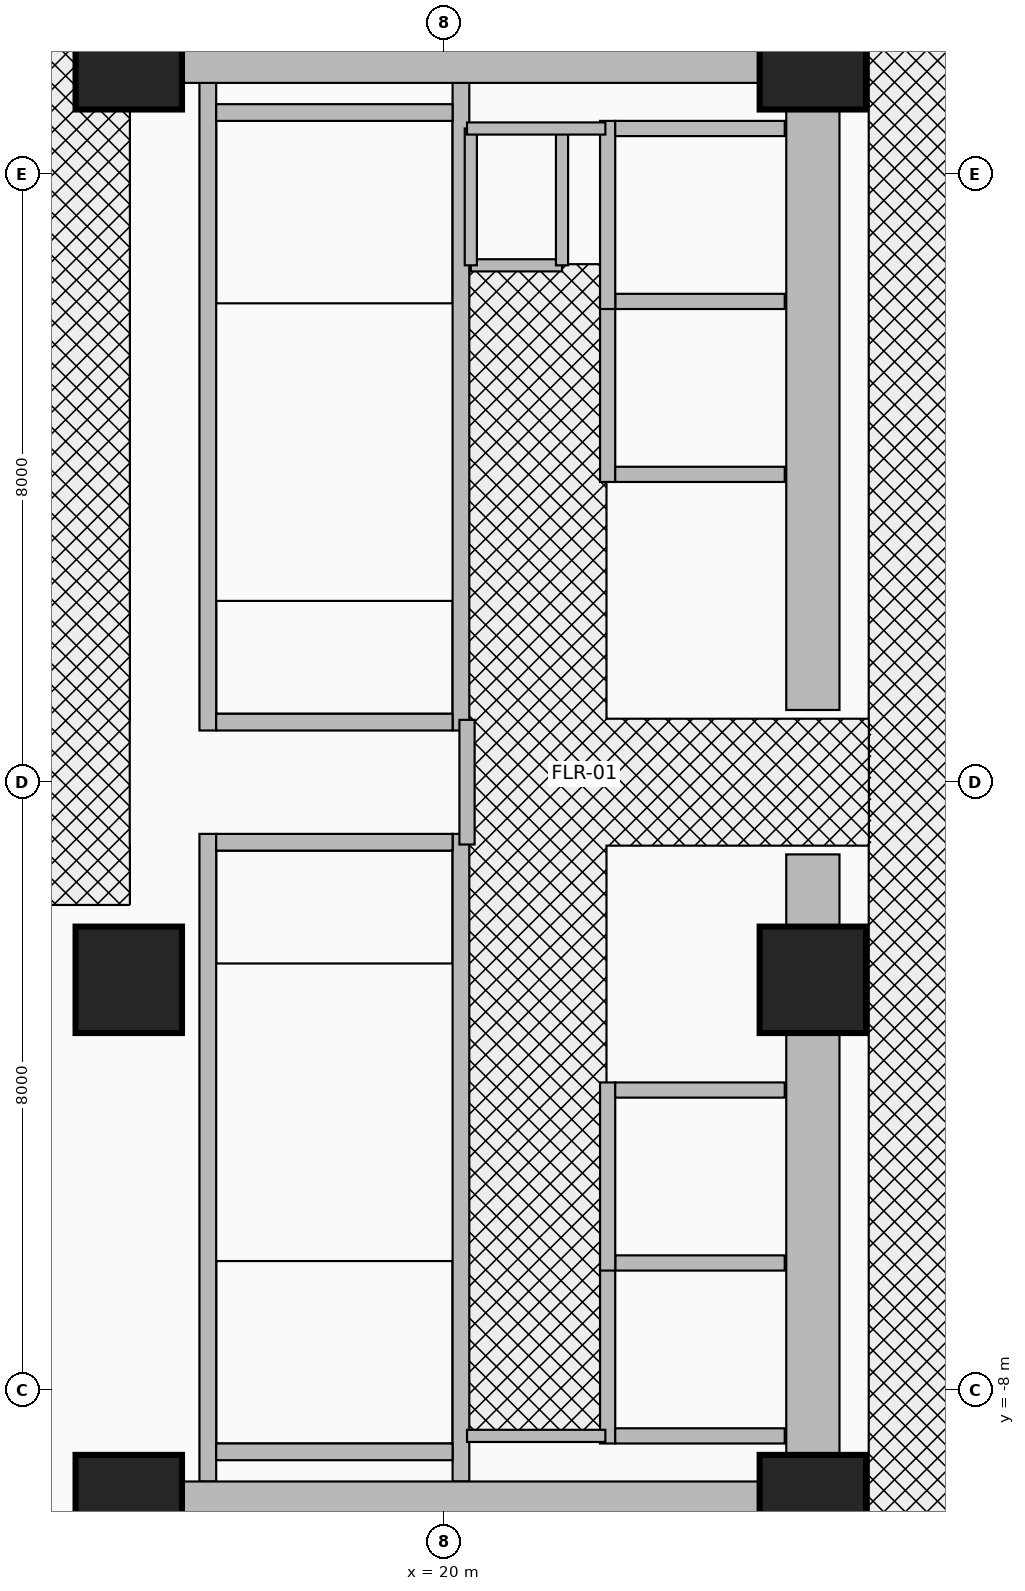
"""IFC4 building model, lengths in metres.
Left out: names, types, materials, properties, quantities, classifications, styles, units other than length and angle.
Written with IfcOpenShell. Run it as: python <this file> out.ifc"""

import sys

from ifc_helpers import new_model, si_unit, direction, frame, frame_2d, origin, origin_2d, place, context, subcontext, project, spatial, rectangle, extrude, source, transform, mapped, element, fill, save


model = new_model("IFC4")
c1 = context("Model", 3, precision=1e-05, world=origin(), true_north=direction((0.0, 1.0)))
c2 = subcontext(c1, "Body", "Model", "MODEL_VIEW")
j1 = project(units=[si_unit("LENGTHUNIT", "METRE"), si_unit("PLANEANGLEUNIT", "RADIAN")], contexts=[c1])
p1 = place(None, origin())
s1 = spatial("IfcSite", under=j1, at=p1, CompositionType="ELEMENT")
p2 = place(p1, origin())
s2 = spatial("IfcBuilding", under=s1, at=p2, CompositionType="ELEMENT")
p3 = place(p2, frame((0.0, 0.0, 15.6)))
s3 = spatial("IfcBuildingStorey", under=s2, at=p3, CompositionType="ELEMENT", Elevation=15.6)
for number, where, z_axis, x_axis in (
    (1, (16.89, 0.68, 0.0), (0.0, 0.0, 1.0), (0.0, 1.0, 0.0)),
    (2, (20.22, 0.68, 0.0), (0.0, 0.0, 1.0), (0.0, 1.0, 0.0)),
):
    element("IfcWall", number, at=place(p3, frame(where, z_axis=z_axis, x_axis=x_axis)), inside=s3, PredefinedType="SHEAR", context=c2, shape_type="SweptSolid", body=[
        extrude(rectangle(XDim=8.52, YDim=0.22, at=frame_2d((4.26, 0.0))), origin(), (0.0, 0.0, 1.0), 4.8),
    ])
p4 = place(p3, frame((17.0, 0.79, 0.0), z_axis=(0.0, 0.0, 1.0), x_axis=(1.0, 0.0, 0.0)))
e3 = element("IfcWall", 3, at=p4, inside=s3, PredefinedType="SHEAR", context=c2, shape_type="SweptSolid", body=[
    extrude(rectangle(XDim=3.11, YDim=0.22, at=frame_2d((1.555, 0.0))), origin(), (0.0, 0.0, 1.0), 4.8),
])
p5 = place(p4, frame((0.95, 0.0, 0.0)))
e4 = element("IfcOpeningElement", 4, at=p5, cuts=e3, PredefinedType="OPENING", context=c2, shape_type="SweptSolid", body=[
    extrude(rectangle(XDim=1.1, YDim=2.15, at=frame_2d((0.55, 1.075))), frame((0.0, 0.125, 0.0), z_axis=(0.0, -1.0, 0.0), x_axis=(1.0, 0.0, 0.0)), (0.0, 0.0, 1.0), 0.25),
])
p6 = place(p3, frame((17.0, 8.81, 0.0), z_axis=(0.0, 0.0, 1.0), x_axis=(1.0, 0.0, 0.0)))
e5 = element("IfcWall", 5, at=p6, inside=s3, PredefinedType="SHEAR", context=c2, shape_type="SweptSolid", body=[
    extrude(rectangle(XDim=3.11, YDim=0.22, at=frame_2d((1.555, 0.0))), origin(), (0.0, 0.0, 1.0), 4.8),
])
for number, where, z_axis, x_axis in (
    (6, (16.89, -9.2, 0.0), (0.0, 0.0, 1.0), (0.0, 1.0, 0.0)),
    (7, (20.22, -9.2, 0.0), (0.0, 0.0, 1.0), (0.0, 1.0, 0.0)),
):
    element("IfcWall", number, at=place(p3, frame(where, z_axis=z_axis, x_axis=x_axis)), inside=s3, PredefinedType="SHEAR", context=c2, shape_type="SweptSolid", body=[
        extrude(rectangle(XDim=8.52, YDim=0.22, at=frame_2d((4.26, 0.0))), origin(), (0.0, 0.0, 1.0), 4.8),
    ])
p7 = place(p3, frame((17.0, -8.81, 0.0), z_axis=(0.0, 0.0, 1.0), x_axis=(1.0, 0.0, 0.0)))
e8 = element("IfcWall", 8, at=p7, inside=s3, PredefinedType="SHEAR", context=c2, shape_type="SweptSolid", body=[
    extrude(rectangle(XDim=3.11, YDim=0.22, at=frame_2d((1.555, 0.0))), origin(), (0.0, 0.0, 1.0), 4.8),
])
p8 = place(p3, frame((17.0, -0.79, 0.0), z_axis=(0.0, 0.0, 1.0), x_axis=(1.0, 0.0, 0.0)))
e9 = element("IfcWall", 9, at=p8, inside=s3, PredefinedType="SHEAR", context=c2, shape_type="SweptSolid", body=[
    extrude(rectangle(XDim=3.11, YDim=0.22, at=frame_2d((1.555, 0.0))), origin(), (0.0, 0.0, 1.0), 4.8),
])
p9 = place(p8, frame((0.95, 0.0, 0.0)))
e10 = element("IfcOpeningElement", 10, at=p9, cuts=e9, PredefinedType="OPENING", context=c2, shape_type="SweptSolid", body=[
    extrude(rectangle(XDim=1.1, YDim=2.15, at=frame_2d((0.55, 1.075))), frame((0.0, 0.125, 0.0), z_axis=(0.0, -1.0, 0.0), x_axis=(1.0, 0.0, 0.0)), (0.0, 0.0, 1.0), 0.25),
])
for number, where, z_axis, x_axis in (
    (11, (24.85, -9.9, 0.0), (0.0, 0.0, 1.0), (0.0, 1.0, 0.0)),
    (12, (24.85, 0.95, 0.0), (0.0, 0.0, 1.0), (0.0, 1.0, 0.0)),
):
    element("IfcWall", number, at=place(p3, frame(where, z_axis=z_axis, x_axis=x_axis)), inside=s3, PredefinedType="SHEAR", context=c2, shape_type="SweptSolid", body=[
        extrude(rectangle(XDim=8.95, YDim=0.7, at=frame_2d((4.475, 0.0))), origin(), (0.0, 0.0, 1.0), 4.8),
    ])
for number, where, z_axis, x_axis in (
    (13, (15.85, 9.55, 0.0), (0.0, 0.0, 1.0), (1.0, 0.0, 0.0)),
    (14, (15.85, -9.55, 0.0), (0.0, 0.0, 1.0), (1.0, 0.0, 0.0)),
):
    element("IfcWall", number, at=place(p3, frame(where, z_axis=z_axis, x_axis=x_axis)), inside=s3, PredefinedType="SHEAR", context=c2, shape_type="SweptSolid", body=[
        extrude(rectangle(XDim=9.0, YDim=0.7, at=frame_2d((4.5, 0.0))), origin(), (0.0, 0.0, 1.0), 4.8),
    ])
m1 = source(origin(), c2, "Body", "SweptSolid", [
    extrude(rectangle(XDim=1.4, YDim=1.4, at=origin_2d()), origin(), (0.0, 0.0, 1.0), 5.2),
])
for number, where, z_axis, x_axis in (
    (15, (15.85, -9.55, 0.0), (0.0, 0.0, 1.0), (1.0, 0.0, 0.0)),
    (16, (24.85, -9.55, 0.0), (0.0, 0.0, 1.0), (1.0, 0.0, 0.0)),
    (17, (15.85, -2.6, 0.0), (0.0, 0.0, 1.0), (1.0, 0.0, 0.0)),
    (18, (24.85, -2.6, 0.0), (0.0, 0.0, 1.0), (1.0, 0.0, 0.0)),
    (19, (15.85, 9.55, 0.0), (0.0, 0.0, 1.0), (1.0, 0.0, 0.0)),
    (20, (24.85, 9.55, 0.0), (0.0, 0.0, 1.0), (1.0, 0.0, 0.0)),
):
    element("IfcColumn", number, at=place(p3, frame(where, z_axis=z_axis, x_axis=x_axis)), inside=s3, PredefinedType="COLUMN", context=c2, shape_type="MappedRepresentation", body=[
        mapped(m1, transform((0.0, 0.0, 0.0), x_axis=(1.0, 0.0, 0.0), y_axis=(0.0, 1.0, 0.0), z_axis=(0.0, 0.0, 1.0), scale=1.0)),
    ])
p10 = place(p3, frame((22.15, -8.7, 0.0), z_axis=(0.0, 0.0, 1.0), x_axis=(0.0, 1.0, 0.0)))
e21 = element("IfcWall", 21, at=p10, inside=s3, PredefinedType="MOVABLE", context=c2, shape_type="SweptSolid", body=[
    extrude(rectangle(XDim=2.475, YDim=0.2, at=frame_2d((1.237, 0.0))), origin(), (0.0, 0.0, 1.0), 4.8),
])
p11 = place(p10, frame((0.688, 0.0, 0.0)))
e22 = element("IfcOpeningElement", 22, at=p11, cuts=e21, PredefinedType="OPENING", context=c2, shape_type="SweptSolid", body=[
    extrude(rectangle(XDim=1.1, YDim=2.1, at=frame_2d((0.55, 1.05))), frame((0.0, 0.115, 0.0), z_axis=(0.0, -1.0, 0.0), x_axis=(1.0, 0.0, 0.0)), (0.0, 0.0, 1.0), 0.23),
])
for number, where, z_axis, x_axis in (
    (23, (22.25, -8.6, 0.0), (0.0, 0.0, 1.0), (1.0, 0.0, 0.0)),
    (24, (22.25, -6.325, 0.0), (0.0, 0.0, 1.0), (1.0, 0.0, 0.0)),
):
    element("IfcWall", number, at=place(p3, frame(where, z_axis=z_axis, x_axis=x_axis)), inside=s3, PredefinedType="MOVABLE", context=c2, shape_type="SweptSolid", body=[
        extrude(rectangle(XDim=2.23, YDim=0.2, at=frame_2d((1.115, 0.0))), origin(), (0.0, 0.0, 1.0), 4.8),
    ])
p12 = place(p3, frame((22.15, -6.425, 0.0), z_axis=(0.0, 0.0, 1.0), x_axis=(0.0, 1.0, 0.0)))
e25 = element("IfcWall", 25, at=p12, inside=s3, PredefinedType="MOVABLE", context=c2, shape_type="SweptSolid", body=[
    extrude(rectangle(XDim=2.475, YDim=0.2, at=frame_2d((1.238, 0.0))), origin(), (0.0, 0.0, 1.0), 4.8),
])
p13 = place(p12, frame((0.688, 0.0, 0.0)))
e26 = element("IfcOpeningElement", 26, at=p13, cuts=e25, PredefinedType="OPENING", context=c2, shape_type="SweptSolid", body=[
    extrude(rectangle(XDim=1.1, YDim=2.1, at=frame_2d((0.55, 1.05))), frame((0.0, 0.115, 0.0), z_axis=(0.0, -1.0, 0.0), x_axis=(1.0, 0.0, 0.0)), (0.0, 0.0, 1.0), 0.23),
])
p14 = place(p3, frame((22.25, -4.05, 0.0), z_axis=(0.0, 0.0, 1.0), x_axis=(1.0, 0.0, 0.0)))
e27 = element("IfcWall", 27, at=p14, inside=s3, PredefinedType="MOVABLE", context=c2, shape_type="SweptSolid", body=[
    extrude(rectangle(XDim=2.23, YDim=0.2, at=frame_2d((1.115, 0.0))), origin(), (0.0, 0.0, 1.0), 4.8),
])
p15 = place(p3, frame((22.15, 3.95, 0.0), z_axis=(0.0, 0.0, 1.0), x_axis=(0.0, 1.0, 0.0)))
e28 = element("IfcWall", 28, at=p15, inside=s3, PredefinedType="MOVABLE", context=c2, shape_type="SweptSolid", body=[
    extrude(rectangle(XDim=2.475, YDim=0.2, at=frame_2d((1.238, 0.0))), origin(), (0.0, 0.0, 1.0), 4.8),
])
for number, where, z_axis, x_axis in (
    (29, (22.25, 4.05, 0.0), (0.0, 0.0, 1.0), (1.0, 0.0, 0.0)),
    (30, (22.25, 6.325, 0.0), (0.0, 0.0, 1.0), (1.0, 0.0, 0.0)),
):
    element("IfcWall", number, at=place(p3, frame(where, z_axis=z_axis, x_axis=x_axis)), inside=s3, PredefinedType="MOVABLE", context=c2, shape_type="SweptSolid", body=[
        extrude(rectangle(XDim=2.23, YDim=0.2, at=frame_2d((1.115, 0.0))), origin(), (0.0, 0.0, 1.0), 3.745),
    ])
p16 = place(p3, frame((22.15, 6.225, 0.0), z_axis=(0.0, 0.0, 1.0), x_axis=(0.0, 1.0, 0.0)))
e31 = element("IfcWall", 31, at=p16, inside=s3, PredefinedType="MOVABLE", context=c2, shape_type="SweptSolid", body=[
    extrude(rectangle(XDim=2.475, YDim=0.2, at=frame_2d((1.237, 0.0))), origin(), (0.0, 0.0, 1.0), 4.8),
])
p17 = place(p3, frame((22.25, 8.6, 0.0), z_axis=(0.0, 0.0, 1.0), x_axis=(1.0, 0.0, 0.0)))
e32 = element("IfcWall", 32, at=p17, inside=s3, PredefinedType="MOVABLE", context=c2, shape_type="SweptSolid", body=[
    extrude(rectangle(XDim=2.23, YDim=0.2, at=frame_2d((1.115, 0.0))), origin(), (0.0, 0.0, 1.0), 3.745),
])
p18 = place(p3, frame((20.3, -0.82, 0.0), z_axis=(0.0, 0.0, 1.0), x_axis=(0.0, 1.0, 0.0)))
e33 = element("IfcWall", 33, at=p18, inside=s3, PredefinedType="PARTITIONING", context=c2, shape_type="SweptSolid", body=[
    extrude(rectangle(XDim=1.64, YDim=0.2, at=frame_2d((0.82, 0.0))), origin(), (0.0, 0.0, 1.0), 4.8),
])
p19 = place(p18, frame((0.295, 0.0, 0.0)))
e34 = element("IfcOpeningElement", 34, at=p19, cuts=e33, PredefinedType="OPENING", context=c2, shape_type="SweptSolid", body=[
    extrude(rectangle(XDim=1.05, YDim=2.15, at=frame_2d((0.525, 1.075))), frame((0.0, 0.115, 0.0), z_axis=(0.0, -1.0, 0.0), x_axis=(1.0, 0.0, 0.0)), (0.0, 0.0, 1.0), 0.23),
])
p20 = place(p3, frame((20.35, 6.8, 0.0), z_axis=(0.0, 0.0, 1.0), x_axis=(1.0, 0.0, 0.0)))
e35 = element("IfcWall", 35, at=p20, inside=s3, PredefinedType="PARTITIONING", context=c2, shape_type="SweptSolid", body=[
    extrude(rectangle(XDim=1.2, YDim=0.16, at=frame_2d((0.6, 0.0))), origin(), (0.0, 0.0, 1.0), 4.8),
])
p21 = place(p20, frame((0.175, 0.0, 0.0)))
e36 = element("IfcOpeningElement", 36, at=p21, cuts=e35, PredefinedType="OPENING", context=c2, shape_type="SweptSolid", body=[
    extrude(rectangle(XDim=0.85, YDim=2.05, at=frame_2d((0.425, 1.025))), frame((0.0, 0.095, 0.0), z_axis=(0.0, -1.0, 0.0), x_axis=(1.0, 0.0, 0.0)), (0.0, 0.0, 1.0), 0.19),
])
for number, where, z_axis, x_axis in (
    (37, (21.55, 6.8, 0.0), (0.0, 0.0, 1.0), (0.0, 1.0, 0.0)),
    (38, (20.35, 6.8, 0.0), (0.0, 0.0, 1.0), (0.0, 1.0, 0.0)),
):
    element("IfcWall", number, at=place(p3, frame(where, z_axis=z_axis, x_axis=x_axis)), inside=s3, PredefinedType="PARTITIONING", context=c2, shape_type="SweptSolid", body=[
        extrude(rectangle(XDim=1.8, YDim=0.16, at=frame_2d((0.9, 0.0))), origin(), (0.0, 0.0, 1.0), 4.8),
    ])
for number, where, z_axis, x_axis in (
    (39, (20.3, -8.6, 0.0), (0.0, 0.0, 1.0), (1.0, 0.0, 0.0)),
    (40, (20.3, 8.6, 0.0), (0.0, 0.0, 1.0), (1.0, 0.0, 0.0)),
):
    element("IfcWall", number, at=place(p3, frame(where, z_axis=z_axis, x_axis=x_axis)), inside=s3, PredefinedType="PARTITIONING", context=c2, shape_type="SweptSolid", body=[
        extrude(rectangle(XDim=1.82, YDim=0.16, at=frame_2d((0.91, 0.0))), origin(), (0.0, 0.0, 1.0), 4.8),
    ])
p22 = place(p11, origin())
e41 = element("IfcDoor", 41, at=p22, inside=s3, OperationType="DOUBLE_DOOR_SLIDING", PredefinedType="DOOR", context=c2, shape_type="SweptSolid", body=[
    extrude(rectangle(XDim=1.1, YDim=2.1, at=frame_2d((0.55, 1.05))), frame((0.0, 0.025, 0.0), z_axis=(0.0, -1.0, 0.0), x_axis=(1.0, 0.0, 0.0)), (0.0, 0.0, 1.0), 0.05),
])
fill(e22, e41)
p23 = place(p13, origin())
e42 = element("IfcDoor", 42, at=p23, inside=s3, OperationType="DOUBLE_DOOR_SLIDING", PredefinedType="DOOR", context=c2, shape_type="SweptSolid", body=[
    extrude(rectangle(XDim=1.1, YDim=2.1, at=frame_2d((0.55, 1.05))), frame((0.0, 0.025, 0.0), z_axis=(0.0, -1.0, 0.0), x_axis=(1.0, 0.0, 0.0)), (0.0, 0.0, 1.0), 0.05),
])
fill(e26, e42)
p24 = place(p19, frame((1.05, 0.0, 0.0), z_axis=(0.0, 0.0, 1.0), x_axis=(-1.0, 0.0, 0.0)))
e43 = element("IfcDoor", 43, at=p24, inside=s3, OperationType="SINGLE_SWING_LEFT", PredefinedType="DOOR", context=c2, shape_type="SweptSolid", body=[
    extrude(rectangle(XDim=1.05, YDim=2.15, at=frame_2d((0.525, 1.075))), frame((0.0, 0.025, 0.0), z_axis=(0.0, -1.0, 0.0), x_axis=(1.0, 0.0, 0.0)), (0.0, 0.0, 1.0), 0.05),
])
fill(e34, e43)
p25 = place(p5, origin())
e44 = element("IfcDoor", 44, at=p25, inside=s3, OperationType="SINGLE_SWING_RIGHT", PredefinedType="DOOR", context=c2, shape_type="SweptSolid", body=[
    extrude(rectangle(XDim=1.1, YDim=2.15, at=frame_2d((0.55, 1.075))), frame((0.0, 0.025, 0.0), z_axis=(0.0, -1.0, 0.0), x_axis=(1.0, 0.0, 0.0)), (0.0, 0.0, 1.0), 0.05),
])
fill(e4, e44)
p26 = place(p9, frame((1.1, 0.0, 0.0), z_axis=(0.0, 0.0, 1.0), x_axis=(-1.0, 0.0, 0.0)))
e45 = element("IfcDoor", 45, at=p26, inside=s3, OperationType="SINGLE_SWING_LEFT", PredefinedType="DOOR", context=c2, shape_type="SweptSolid", body=[
    extrude(rectangle(XDim=1.1, YDim=2.15, at=frame_2d((0.55, 1.075))), frame((0.0, 0.025, 0.0), z_axis=(0.0, -1.0, 0.0), x_axis=(1.0, 0.0, 0.0)), (0.0, 0.0, 1.0), 0.05),
])
fill(e10, e45)
p27 = place(p21, origin())
e46 = element("IfcDoor", 46, at=p27, inside=s3, OperationType="SINGLE_SWING_RIGHT", PredefinedType="DOOR", context=c2, shape_type="SweptSolid", body=[
    extrude(rectangle(XDim=0.85, YDim=2.05, at=frame_2d((0.425, 1.025))), frame((0.0, 0.025, 0.0), z_axis=(0.0, -1.0, 0.0), x_axis=(1.0, 0.0, 0.0)), (0.0, 0.0, 1.0), 0.05),
])
fill(e36, e46)
save(model, sys.argv[1])
